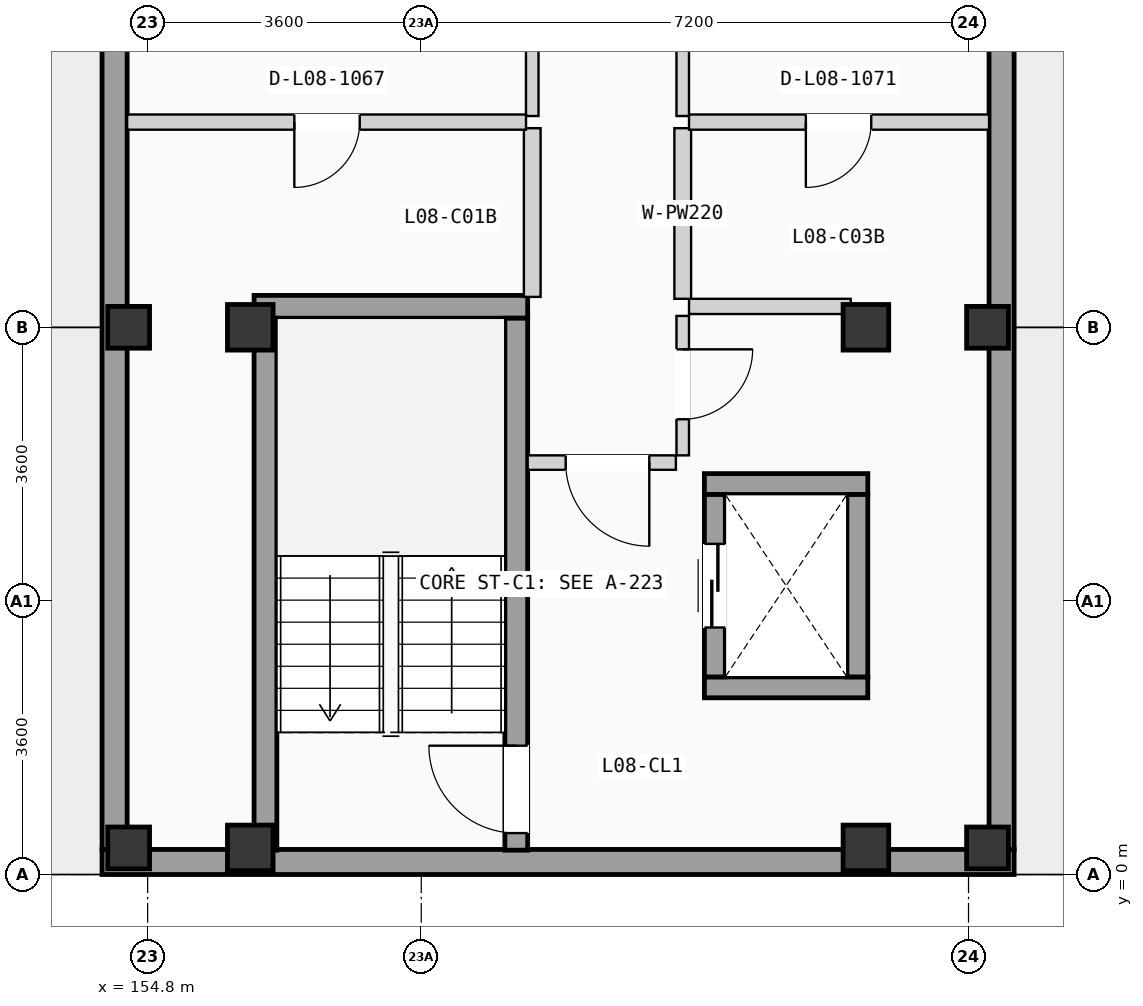
"""IFC4 building model, lengths in metres.
Left out: names, types, materials, properties, quantities, classifications, styles, units other than length and angle.
Written with IfcOpenShell. Run it as: python <this file> out.ifc"""

import sys

from ifc_helpers import new_model, si_unit, direction, frame, frame_2d, origin, origin_2d, place, context, subcontext, project, spatial, rectangle, extrude, element, fill, save


model = new_model("IFC4")
c1 = context("Model", 3, precision=1e-05, world=origin(), true_north=direction((0.0, 1.0)))
c2 = subcontext(c1, "Body", "Model", "MODEL_VIEW")
j1 = project(units=[si_unit("LENGTHUNIT", "METRE"), si_unit("PLANEANGLEUNIT", "RADIAN")], contexts=[c1])
p1 = place(None, origin())
s1 = spatial("IfcSite", under=j1, at=p1, CompositionType="ELEMENT")
p2 = place(p1, origin())
s2 = spatial("IfcBuilding", under=s1, at=p2, CompositionType="ELEMENT")
p3 = place(p2, frame((0.0, 0.0, 27.825)))
s3 = spatial("IfcBuildingStorey", under=s2, at=p3, CompositionType="ELEMENT", Elevation=27.825)
for number, where, z_axis, x_axis in (
    (1, (154.55, 0.35, 0.0), (0.0, 0.0, 1.0), (1.0, 0.0, 0.0)),
    (2, (154.55, 7.2, 0.0), (0.0, 0.0, 1.0), (1.0, 0.0, 0.0)),
):
    element("IfcColumn", number, at=place(p3, frame(where, z_axis=z_axis, x_axis=x_axis)), inside=s3, PredefinedType="COLUMN", context=c2, shape_type="SweptSolid", body=[
        extrude(rectangle(XDim=0.55, YDim=0.55, at=origin_2d()), origin(), (0.0, 0.0, 1.0), 3.15),
    ])
for number, where, z_axis, x_axis in (
    (3, (156.15, 0.35, 0.0), (0.0, 0.0, 1.0), (1.0, 0.0, 0.0)),
    (4, (156.15, 7.2, 0.0), (0.0, 0.0, 1.0), (1.0, 0.0, 0.0)),
    (5, (164.25, 0.35, 0.0), (0.0, 0.0, 1.0), (1.0, 0.0, 0.0)),
    (6, (164.25, 7.2, 0.0), (0.0, 0.0, 1.0), (1.0, 0.0, 0.0)),
):
    element("IfcColumn", number, at=place(p3, frame(where, z_axis=z_axis, x_axis=x_axis)), inside=s3, PredefinedType="COLUMN", context=c2, shape_type="SweptSolid", body=[
        extrude(rectangle(XDim=0.6, YDim=0.6, at=origin_2d()), origin(), (0.0, 0.0, 1.0), 3.15),
    ])
for number, where, z_axis, x_axis in (
    (7, (165.85, 0.35, 0.0), (0.0, 0.0, 1.0), (1.0, 0.0, 0.0)),
    (8, (165.85, 7.2, 0.0), (0.0, 0.0, 1.0), (1.0, 0.0, 0.0)),
):
    element("IfcColumn", number, at=place(p3, frame(where, z_axis=z_axis, x_axis=x_axis)), inside=s3, PredefinedType="COLUMN", context=c2, shape_type="SweptSolid", body=[
        extrude(rectangle(XDim=0.55, YDim=0.55, at=origin_2d()), origin(), (0.0, 0.0, 1.0), 3.15),
    ])
p4 = place(p3, frame((154.2, 0.165, 0.0), z_axis=(0.0, 0.0, 1.0), x_axis=(1.0, 0.0, 0.0)))
e9 = element("IfcWall", 9, at=p4, inside=s3, PredefinedType="SOLIDWALL", context=c2, shape_type="SweptSolid", body=[
    extrude(rectangle(XDim=12.0, YDim=0.33, at=frame_2d((6.0, 0.0))), origin(), (0.0, 0.0, 1.0), 2.89),
])
p5 = place(p3, frame((154.365, 0.33, 0.0), z_axis=(0.0, 0.0, 1.0), x_axis=(0.0, 1.0, 0.0)))
e10 = element("IfcWall", 10, at=p5, inside=s3, PredefinedType="SOLIDWALL", context=c2, shape_type="SweptSolid", body=[
    extrude(rectangle(XDim=49.74, YDim=0.33, at=frame_2d((24.87, 0.0))), origin(), (0.0, 0.0, 1.0), 2.89),
])
p6 = place(p5, frame((10.8, 0.0, 0.705)))
e11 = element("IfcOpeningElement", 11, at=p6, cuts=e10, PredefinedType="OPENING", context=c2, shape_type="SweptSolid", body=[
    extrude(rectangle(XDim=1.85, YDim=1.5, at=frame_2d((0.925, 0.75))), frame((0.0, 0.175, 0.0), z_axis=(0.0, -1.0, 0.0), x_axis=(1.0, 0.0, 0.0)), (0.0, 0.0, 1.0), 0.35),
])
p7 = place(p5, frame((17.746, 0.0, 0.555)))
e12 = element("IfcOpeningElement", 12, at=p7, cuts=e10, PredefinedType="OPENING", context=c2, shape_type="SweptSolid", body=[
    extrude(rectangle(XDim=1.85, YDim=1.65, at=frame_2d((0.925, 0.825))), frame((0.0, 0.175, 0.0), z_axis=(0.0, -1.0, 0.0), x_axis=(1.0, 0.0, 0.0)), (0.0, 0.0, 1.0), 0.35),
])
p8 = place(p5, frame((31.595, 0.0, 0.85)))
e13 = element("IfcOpeningElement", 13, at=p8, cuts=e10, PredefinedType="OPENING", context=c2, shape_type="SweptSolid", body=[
    extrude(rectangle(XDim=0.95, YDim=1.2, at=frame_2d((0.475, 0.6))), frame((0.0, 0.175, 0.0), z_axis=(0.0, -1.0, 0.0), x_axis=(1.0, 0.0, 0.0)), (0.0, 0.0, 1.0), 0.35),
])
p9 = place(p3, frame((166.035, 0.33, 0.0), z_axis=(0.0, 0.0, 1.0), x_axis=(0.0, 1.0, 0.0)))
e14 = element("IfcWall", 14, at=p9, inside=s3, PredefinedType="SOLIDWALL", context=c2, shape_type="SweptSolid", body=[
    extrude(rectangle(XDim=49.74, YDim=0.33, at=frame_2d((24.87, 0.0))), origin(), (0.0, 0.0, 1.0), 2.89),
])
p10 = place(p9, frame((10.725, 0.0, 0.9)))
e15 = element("IfcOpeningElement", 15, at=p10, cuts=e14, PredefinedType="OPENING", context=c2, shape_type="SweptSolid", body=[
    extrude(rectangle(XDim=2.0, YDim=1.2, at=frame_2d((1.0, 0.6))), frame((0.0, 0.175, 0.0), z_axis=(0.0, -1.0, 0.0), x_axis=(1.0, 0.0, 0.0)), (0.0, 0.0, 1.0), 0.35),
])
p11 = place(p9, frame((17.671, 0.0, 0.855)))
e16 = element("IfcOpeningElement", 16, at=p11, cuts=e14, PredefinedType="OPENING", context=c2, shape_type="SweptSolid", body=[
    extrude(rectangle(XDim=2.0, YDim=1.35, at=frame_2d((1.0, 0.675))), frame((0.0, 0.175, 0.0), z_axis=(0.0, -1.0, 0.0), x_axis=(1.0, 0.0, 0.0)), (0.0, 0.0, 1.0), 0.35),
])
p12 = place(p9, frame((31.07, 0.0, 0.705)))
e17 = element("IfcOpeningElement", 17, at=p12, cuts=e14, PredefinedType="OPENING", context=c2, shape_type="SweptSolid", body=[
    extrude(rectangle(XDim=2.0, YDim=1.5, at=frame_2d((1.0, 0.75))), frame((0.0, 0.175, 0.0), z_axis=(0.0, -1.0, 0.0), x_axis=(1.0, 0.0, 0.0)), (0.0, 0.0, 1.0), 0.35),
])
p13 = place(p3, frame((156.2, 7.47, 0.0), z_axis=(0.0, 0.0, 1.0), x_axis=(1.0, 0.0, 0.0)))
e18 = element("IfcWall", 18, at=p13, inside=s3, PredefinedType="SHEAR", context=c2, shape_type="SweptSolid", body=[
    extrude(rectangle(XDim=3.6, YDim=0.3, at=frame_2d((1.8, 0.0))), origin(), (0.0, 0.0, 1.0), 2.89),
])
p14 = place(p3, frame((156.35, 0.32, 0.0), z_axis=(0.0, 0.0, 1.0), x_axis=(0.0, 1.0, 0.0)))
e19 = element("IfcWall", 19, at=p14, inside=s3, PredefinedType="SHEAR", context=c2, shape_type="SweptSolid", body=[
    extrude(rectangle(XDim=7.0, YDim=0.3, at=frame_2d((3.5, 0.0))), origin(), (0.0, 0.0, 1.0), 2.89),
])
p15 = place(p3, frame((159.65, 0.32, 0.0), z_axis=(0.0, 0.0, 1.0), x_axis=(0.0, 1.0, 0.0)))
e20 = element("IfcWall", 20, at=p15, inside=s3, PredefinedType="SHEAR", context=c2, shape_type="SweptSolid", body=[
    extrude(rectangle(XDim=7.0, YDim=0.3, at=frame_2d((3.5, 0.0))), origin(), (0.0, 0.0, 1.0), 2.89),
])
p16 = place(p15, frame((0.225, 0.0, 0.0)))
e21 = element("IfcOpeningElement", 21, at=p16, cuts=e20, PredefinedType="OPENING", context=c2, shape_type="SweptSolid", body=[
    extrude(rectangle(XDim=1.15, YDim=2.12, at=frame_2d((0.575, 1.06))), frame((0.0, 0.16, 0.0), z_axis=(0.0, -1.0, 0.0), x_axis=(1.0, 0.0, 0.0)), (0.0, 0.0, 1.0), 0.32),
])
for number, where, z_axis, x_axis in (
    (22, (162.125, 2.462, 0.0), (0.0, 0.0, 1.0), (1.0, 0.0, 0.0)),
    (23, (162.125, 5.137, 0.0), (0.0, 0.0, 1.0), (1.0, 0.0, 0.0)),
):
    element("IfcWall", number, at=place(p3, frame(where, z_axis=z_axis, x_axis=x_axis)), inside=s3, PredefinedType="SHEAR", context=c2, shape_type="SweptSolid", body=[
        extrude(rectangle(XDim=2.15, YDim=0.275, at=frame_2d((1.075, 0.0))), origin(), (0.0, 0.0, 1.0), 2.89),
    ])
p17 = place(p3, frame((162.262, 2.6, 0.0), z_axis=(0.0, 0.0, 1.0), x_axis=(0.0, 1.0, 0.0)))
e24 = element("IfcWall", 24, at=p17, inside=s3, PredefinedType="SHEAR", context=c2, shape_type="SweptSolid", body=[
    extrude(rectangle(XDim=2.4, YDim=0.275, at=frame_2d((1.2, 0.0))), origin(), (0.0, 0.0, 1.0), 2.89),
])
p18 = place(p17, frame((0.65, 0.0, 0.0)))
e25 = element("IfcOpeningElement", 25, at=p18, cuts=e24, PredefinedType="OPENING", context=c2, shape_type="SweptSolid", body=[
    extrude(rectangle(XDim=1.1, YDim=2.15, at=frame_2d((0.55, 1.075))), frame((0.0, 0.147, 0.0), z_axis=(0.0, -1.0, 0.0), x_axis=(1.0, 0.0, 0.0)), (0.0, 0.0, 1.0), 0.295),
])
p19 = place(p3, frame((164.137, 2.6, 0.0), z_axis=(0.0, 0.0, 1.0), x_axis=(0.0, 1.0, 0.0)))
e26 = element("IfcWall", 26, at=p19, inside=s3, PredefinedType="SHEAR", context=c2, shape_type="SweptSolid", body=[
    extrude(rectangle(XDim=2.4, YDim=0.275, at=frame_2d((1.2, 0.0))), origin(), (0.0, 0.0, 1.0), 2.89),
])
p20 = place(p3, frame((159.8, 5.42, 0.0), z_axis=(0.0, 0.0, 1.0), x_axis=(1.0, 0.0, 0.0)))
e27 = element("IfcWall", 27, at=p20, inside=s3, PredefinedType="PARTITIONING", context=c2, shape_type="SweptSolid", body=[
    extrude(rectangle(XDim=1.95, YDim=0.19, at=frame_2d((0.975, 0.0))), origin(), (0.0, 0.0, 1.0), 2.87),
])
p21 = place(p20, frame((0.5, 0.0, 0.0)))
e28 = element("IfcOpeningElement", 28, at=p21, cuts=e27, PredefinedType="OPENING", context=c2, shape_type="SweptSolid", body=[
    extrude(rectangle(XDim=1.1, YDim=2.12, at=frame_2d((0.55, 1.06))), frame((0.0, 0.105, 0.0), z_axis=(0.0, -1.0, 0.0), x_axis=(1.0, 0.0, 0.0)), (0.0, 0.0, 1.0), 0.21),
])
p22 = place(p3, frame((161.84, 5.515, 0.0), z_axis=(0.0, 0.0, 1.0), x_axis=(0.0, 1.0, 0.0)))
e29 = element("IfcWall", 29, at=p22, inside=s3, PredefinedType="PARTITIONING", context=c2, shape_type="SweptSolid", body=[
    extrude(rectangle(XDim=1.835, YDim=0.165, at=frame_2d((0.917, 0.0))), origin(), (0.0, 0.0, 1.0), 2.87),
])
p23 = place(p22, frame((0.475, 0.0, 0.0)))
e30 = element("IfcOpeningElement", 30, at=p23, cuts=e29, PredefinedType="OPENING", context=c2, shape_type="SweptSolid", body=[
    extrude(rectangle(XDim=0.92, YDim=2.04, at=frame_2d((0.46, 1.02))), frame((0.0, 0.093, 0.0), z_axis=(0.0, -1.0, 0.0), x_axis=(1.0, 0.0, 0.0)), (0.0, 0.0, 1.0), 0.185),
])
p24 = place(p3, frame((161.923, 7.475, 0.0), z_axis=(0.0, 0.0, 1.0), x_axis=(1.0, 0.0, 0.0)))
e31 = element("IfcWall", 31, at=p24, inside=s3, PredefinedType="PLUMBINGWALL", context=c2, shape_type="SweptSolid", body=[
    extrude(rectangle(XDim=2.127, YDim=0.2, at=frame_2d((1.063, 0.0))), origin(), (0.0, 0.0, 1.0), 2.87),
])
p25 = place(p3, frame((159.86, 7.6, 0.0), z_axis=(0.0, 0.0, 1.0), x_axis=(0.0, 1.0, 0.0)))
e32 = element("IfcWall", 32, at=p25, inside=s3, PredefinedType="PLUMBINGWALL", context=c2, shape_type="SweptSolid", body=[
    extrude(rectangle(XDim=2.22, YDim=0.22, at=frame_2d((1.11, 0.0))), origin(), (0.0, 0.0, 1.0), 2.87),
])
p26 = place(p3, frame((159.86, 9.98, 0.0), z_axis=(0.0, 0.0, 1.0), x_axis=(0.0, 1.0, 0.0)))
e33 = element("IfcWall", 33, at=p26, inside=s3, PredefinedType="PARTITIONING", context=c2, shape_type="SweptSolid", body=[
    extrude(rectangle(XDim=6.976, YDim=0.165, at=frame_2d((3.488, 0.0))), origin(), (0.0, 0.0, 1.0), 2.87),
])
p27 = place(p26, frame((2.963, 0.0, 0.0)))
e34 = element("IfcOpeningElement", 34, at=p27, cuts=e33, PredefinedType="OPENING", context=c2, shape_type="SweptSolid", body=[
    extrude(rectangle(XDim=1.05, YDim=2.13, at=frame_2d((0.525, 1.065))), frame((0.0, 0.093, 0.0), z_axis=(0.0, -1.0, 0.0), x_axis=(1.0, 0.0, 0.0)), (0.0, 0.0, 1.0), 0.185),
])
p28 = place(p3, frame((161.84, 7.575, 0.0), z_axis=(0.0, 0.0, 1.0), x_axis=(0.0, 1.0, 0.0)))
e35 = element("IfcWall", 35, at=p28, inside=s3, PredefinedType="PLUMBINGWALL", context=c2, shape_type="SweptSolid", body=[
    extrude(rectangle(XDim=2.245, YDim=0.22, at=frame_2d((1.123, 0.0))), origin(), (0.0, 0.0, 1.0), 2.87),
])
p29 = place(p3, frame((161.84, 9.98, 0.0), z_axis=(0.0, 0.0, 1.0), x_axis=(0.0, 1.0, 0.0)))
e36 = element("IfcWall", 36, at=p29, inside=s3, PredefinedType="PARTITIONING", context=c2, shape_type="SweptSolid", body=[
    extrude(rectangle(XDim=6.976, YDim=0.165, at=frame_2d((3.488, 0.0))), origin(), (0.0, 0.0, 1.0), 2.87),
])
p30 = place(p29, frame((2.963, 0.0, 0.0)))
e37 = element("IfcOpeningElement", 37, at=p30, cuts=e36, PredefinedType="OPENING", context=c2, shape_type="SweptSolid", body=[
    extrude(rectangle(XDim=1.05, YDim=2.13, at=frame_2d((0.525, 1.065))), frame((0.0, 0.093, 0.0), z_axis=(0.0, -1.0, 0.0), x_axis=(1.0, 0.0, 0.0)), (0.0, 0.0, 1.0), 0.185),
])
p31 = place(p3, frame((154.53, 9.9, 0.0), z_axis=(0.0, 0.0, 1.0), x_axis=(1.0, 0.0, 0.0)))
e38 = element("IfcWall", 38, at=p31, inside=s3, PredefinedType="PLUMBINGWALL", context=c2, shape_type="SweptSolid", body=[
    extrude(rectangle(XDim=5.248, YDim=0.2, at=frame_2d((2.624, 0.0))), origin(), (0.0, 0.0, 1.0), 2.87),
])
p32 = place(p31, frame((2.2, 0.0, 0.0)))
e39 = element("IfcOpeningElement", 39, at=p32, cuts=e38, PredefinedType="OPENING", context=c2, shape_type="SweptSolid", body=[
    extrude(rectangle(XDim=0.86, YDim=2.0, at=frame_2d((0.43, 1.0))), frame((0.0, 0.11, 0.0), z_axis=(0.0, -1.0, 0.0), x_axis=(1.0, 0.0, 0.0)), (0.0, 0.0, 1.0), 0.22),
])
p33 = place(p3, frame((161.923, 9.9, 0.0), z_axis=(0.0, 0.0, 1.0), x_axis=(1.0, 0.0, 0.0)))
e40 = element("IfcWall", 40, at=p33, inside=s3, PredefinedType="PLUMBINGWALL", context=c2, shape_type="SweptSolid", body=[
    extrude(rectangle(XDim=3.947, YDim=0.2, at=frame_2d((1.974, 0.0))), origin(), (0.0, 0.0, 1.0), 2.87),
])
p34 = place(p33, frame((1.537, 0.0, 0.0)))
e41 = element("IfcOpeningElement", 41, at=p34, cuts=e40, PredefinedType="OPENING", context=c2, shape_type="SweptSolid", body=[
    extrude(rectangle(XDim=0.86, YDim=2.0, at=frame_2d((0.43, 1.0))), frame((0.0, 0.11, 0.0), z_axis=(0.0, -1.0, 0.0), x_axis=(1.0, 0.0, 0.0)), (0.0, 0.0, 1.0), 0.22),
])
p35 = place(p16, origin())
e42 = element("IfcDoor", 42, at=p35, inside=s3, OperationType="SINGLE_SWING_RIGHT", PredefinedType="DOOR", context=c2, shape_type="SweptSolid", body=[
    extrude(rectangle(XDim=1.15, YDim=2.12, at=frame_2d((0.575, 1.06))), frame((0.0, 0.025, 0.0), z_axis=(0.0, -1.0, 0.0), x_axis=(1.0, 0.0, 0.0)), (0.0, 0.0, 1.0), 0.05),
])
fill(e21, e42)
p36 = place(p18, origin())
e43 = element("IfcDoor", 43, at=p36, inside=s3, OperationType="SLIDING_TO_LEFT", PredefinedType="DOOR", context=c2, shape_type="SweptSolid", body=[
    extrude(rectangle(XDim=1.1, YDim=2.15, at=frame_2d((0.55, 1.075))), frame((0.0, 0.025, 0.0), z_axis=(0.0, -1.0, 0.0), x_axis=(1.0, 0.0, 0.0)), (0.0, 0.0, 1.0), 0.05),
])
fill(e25, e43)
p37 = place(p21, frame((1.1, 0.0, 0.0), z_axis=(0.0, 0.0, 1.0), x_axis=(-1.0, 0.0, 0.0)))
e44 = element("IfcDoor", 44, at=p37, inside=s3, OperationType="SINGLE_SWING_RIGHT", PredefinedType="DOOR", context=c2, shape_type="SweptSolid", body=[
    extrude(rectangle(XDim=1.1, YDim=2.12, at=frame_2d((0.55, 1.06))), frame((0.0, 0.025, 0.0), z_axis=(0.0, -1.0, 0.0), x_axis=(1.0, 0.0, 0.0)), (0.0, 0.0, 1.0), 0.05),
])
fill(e28, e44)
p38 = place(p23, frame((0.92, 0.0, 0.0), z_axis=(0.0, 0.0, 1.0), x_axis=(-1.0, 0.0, 0.0)))
e45 = element("IfcDoor", 45, at=p38, inside=s3, OperationType="SINGLE_SWING_RIGHT", PredefinedType="DOOR", context=c2, shape_type="SweptSolid", body=[
    extrude(rectangle(XDim=0.92, YDim=2.04, at=frame_2d((0.46, 1.02))), frame((0.0, 0.025, 0.0), z_axis=(0.0, -1.0, 0.0), x_axis=(1.0, 0.0, 0.0)), (0.0, 0.0, 1.0), 0.05),
])
fill(e30, e45)
p39 = place(p32, frame((0.86, 0.0, 0.0), z_axis=(0.0, 0.0, 1.0), x_axis=(-1.0, 0.0, 0.0)))
e46 = element("IfcDoor", 46, at=p39, inside=s3, OperationType="SINGLE_SWING_LEFT", PredefinedType="DOOR", context=c2, shape_type="SweptSolid", body=[
    extrude(rectangle(XDim=0.86, YDim=2.0, at=frame_2d((0.43, 1.0))), frame((0.0, 0.025, 0.0), z_axis=(0.0, -1.0, 0.0), x_axis=(1.0, 0.0, 0.0)), (0.0, 0.0, 1.0), 0.05),
])
fill(e39, e46)
p40 = place(p34, frame((0.86, 0.0, 0.0), z_axis=(0.0, 0.0, 1.0), x_axis=(-1.0, 0.0, 0.0)))
e47 = element("IfcDoor", 47, at=p40, inside=s3, OperationType="SINGLE_SWING_LEFT", PredefinedType="DOOR", context=c2, shape_type="SweptSolid", body=[
    extrude(rectangle(XDim=0.86, YDim=2.0, at=frame_2d((0.43, 1.0))), frame((0.0, 0.025, 0.0), z_axis=(0.0, -1.0, 0.0), x_axis=(1.0, 0.0, 0.0)), (0.0, 0.0, 1.0), 0.05),
])
fill(e41, e47)
save(model, sys.argv[1])
